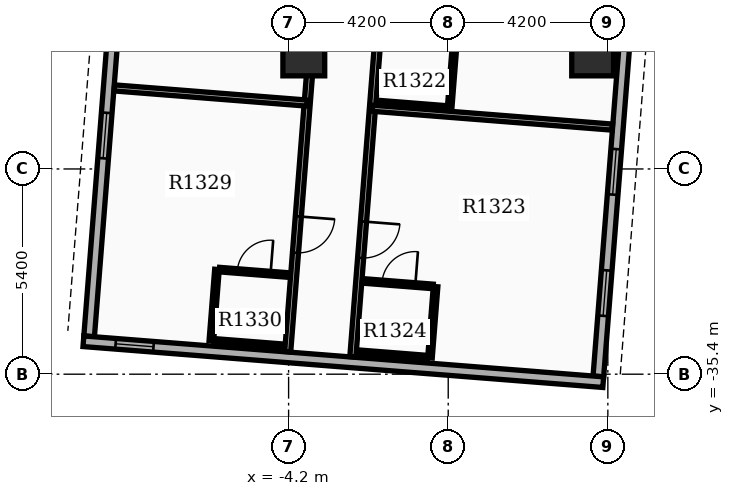
"""IFC4 building model, lengths in metres.
Left out: names, types, materials, properties, quantities, classifications, styles, units other than length and angle.
Written with IfcOpenShell. Run it as: python <this file> out.ifc"""

import sys

from ifc_helpers import new_model, si_unit, direction, frame, frame_2d, origin, origin_2d, place, context, subcontext, project, spatial, rectangle, extrude, element, fill, save


model = new_model("IFC4")
c1 = context("Model", 3, precision=1e-05, world=origin(), true_north=direction((0.0, 1.0)))
c2 = subcontext(c1, "Body", "Model", "MODEL_VIEW")
j1 = project(units=[si_unit("LENGTHUNIT", "METRE"), si_unit("PLANEANGLEUNIT", "RADIAN")], contexts=[c1])
p1 = place(None, origin())
s1 = spatial("IfcSite", under=j1, at=p1, CompositionType="ELEMENT")
p2 = place(p1, origin())
s2 = spatial("IfcBuilding", under=s1, at=p2, CompositionType="ELEMENT")
p3 = place(p2, frame((0.0, 0.0, 83.4)))
s3 = spatial("IfcBuildingStorey", under=s2, at=p3, CompositionType="ELEMENT", Elevation=83.4)
for number, where, z_axis, x_axis in (
    (1, (-3.8, -27.0, 0.0), (0.0, 0.0, 1.0), (1.0, 0.0, 0.0)),
    (2, (3.8, -27.0, 0.0), (0.0, 0.0, 1.0), (1.0, 0.0, 0.0)),
):
    element("IfcColumn", number, at=place(p3, frame(where, z_axis=z_axis, x_axis=x_axis)), inside=s3, PredefinedType="COLUMN", context=c2, shape_type="SweptSolid", body=[
        extrude(rectangle(XDim=1.1, YDim=1.1, at=origin_2d()), origin(), (0.0, 0.0, 1.0), 3.9),
    ])
p4 = place(p3, frame((-7.872, -14.367, 0.0), z_axis=(0.0, 0.0, 1.0), x_axis=(-0.078452802979, -0.996917828963, 0.0)))
e3 = element("IfcWall", 3, at=p4, inside=s3, PredefinedType="STANDARD", context=c2, shape_type="SweptSolid", body=[
    extrude(rectangle(XDim=20.1, YDim=0.28, at=frame_2d((10.05, 0.0))), origin(), (0.0, 0.0, 1.0), 2.91),
])
p5 = place(p4, frame((1.6, 0.0, 0.8)))
e4 = element("IfcOpeningElement", 4, at=p5, cuts=e3, PredefinedType="OPENING", context=c2, shape_type="SweptSolid", body=[
    extrude(rectangle(XDim=1.2, YDim=1.6, at=frame_2d((0.6, 0.8))), frame((0.0, 0.15, 0.0), z_axis=(0.0, -1.0, 0.0), x_axis=(1.0, 0.0, 0.0)), (0.0, 0.0, 1.0), 0.3),
])
p6 = place(p4, frame((7.05, 0.0, 0.8)))
e5 = element("IfcOpeningElement", 5, at=p6, cuts=e3, PredefinedType="OPENING", context=c2, shape_type="SweptSolid", body=[
    extrude(rectangle(XDim=1.2, YDim=1.6, at=frame_2d((0.6, 0.8))), frame((0.0, 0.15, 0.0), z_axis=(0.0, -1.0, 0.0), x_axis=(1.0, 0.0, 0.0)), (0.0, 0.0, 1.0), 0.3),
])
p7 = place(p4, frame((10.25, 0.0, 0.8)))
e6 = element("IfcOpeningElement", 6, at=p7, cuts=e3, PredefinedType="OPENING", context=c2, shape_type="SweptSolid", body=[
    extrude(rectangle(XDim=1.2, YDim=1.6, at=frame_2d((0.6, 0.8))), frame((0.0, 0.15, 0.0), z_axis=(0.0, -1.0, 0.0), x_axis=(1.0, 0.0, 0.0)), (0.0, 0.0, 1.0), 0.3),
])
p8 = place(p4, frame((14.2, 0.0, 0.8)))
e7 = element("IfcOpeningElement", 7, at=p8, cuts=e3, PredefinedType="OPENING", context=c2, shape_type="SweptSolid", body=[
    extrude(rectangle(XDim=1.2, YDim=1.6, at=frame_2d((0.6, 0.8))), frame((0.0, 0.15, 0.0), z_axis=(0.0, -1.0, 0.0), x_axis=(1.0, 0.0, 0.0)), (0.0, 0.0, 1.0), 0.3),
])
p9 = place(p3, frame((3.95, -35.459, 0.0), z_axis=(0.0, 0.0, 1.0), x_axis=(0.078452802979, 0.996917828963, 0.0)))
e8 = element("IfcWall", 8, at=p9, inside=s3, PredefinedType="STANDARD", context=c2, shape_type="SweptSolid", body=[
    extrude(rectangle(XDim=20.1, YDim=0.28, at=frame_2d((10.05, 0.0))), origin(), (0.0, 0.0, 1.0), 2.91),
])
p10 = place(p9, frame((1.6, 0.0, 0.8)))
e9 = element("IfcOpeningElement", 9, at=p10, cuts=e8, PredefinedType="OPENING", context=c2, shape_type="SweptSolid", body=[
    extrude(rectangle(XDim=1.2, YDim=1.6, at=frame_2d((0.6, 0.8))), frame((0.0, 0.15, 0.0), z_axis=(0.0, -1.0, 0.0), x_axis=(1.0, 0.0, 0.0)), (0.0, 0.0, 1.0), 0.3),
])
p11 = place(p9, frame((4.8, 0.0, 0.8)))
e10 = element("IfcOpeningElement", 10, at=p11, cuts=e8, PredefinedType="OPENING", context=c2, shape_type="SweptSolid", body=[
    extrude(rectangle(XDim=1.2, YDim=1.6, at=frame_2d((0.6, 0.8))), frame((0.0, 0.15, 0.0), z_axis=(0.0, -1.0, 0.0), x_axis=(1.0, 0.0, 0.0)), (0.0, 0.0, 1.0), 0.3),
])
p12 = place(p9, frame((9.5, 0.0, 0.8)))
e11 = element("IfcOpeningElement", 11, at=p12, cuts=e8, PredefinedType="OPENING", context=c2, shape_type="SweptSolid", body=[
    extrude(rectangle(XDim=1.2, YDim=1.6, at=frame_2d((0.6, 0.8))), frame((0.0, 0.15, 0.0), z_axis=(0.0, -1.0, 0.0), x_axis=(1.0, 0.0, 0.0)), (0.0, 0.0, 1.0), 0.3),
])
p13 = place(p9, frame((14.2, 0.0, 0.8)))
e12 = element("IfcOpeningElement", 12, at=p13, cuts=e8, PredefinedType="OPENING", context=c2, shape_type="SweptSolid", body=[
    extrude(rectangle(XDim=1.2, YDim=1.6, at=frame_2d((0.6, 0.8))), frame((0.0, 0.15, 0.0), z_axis=(0.0, -1.0, 0.0), x_axis=(1.0, 0.0, 0.0)), (0.0, 0.0, 1.0), 0.3),
])
p14 = place(p3, frame((-9.599, -34.533, 0.0), z_axis=(0.0, 0.0, 1.0), x_axis=(0.996916198482, -0.078473519122, 0.0)))
e13 = element("IfcWall", 13, at=p14, inside=s3, PredefinedType="STANDARD", context=c2, shape_type="SweptSolid", body=[
    extrude(rectangle(XDim=13.72, YDim=0.28, at=frame_2d((6.86, 0.0))), origin(), (0.0, 0.0, 1.0), 2.91),
])
p15 = place(p14, frame((0.85, 0.0, 0.85)))
e14 = element("IfcOpeningElement", 14, at=p15, cuts=e13, PredefinedType="OPENING", context=c2, shape_type="SweptSolid", body=[
    extrude(rectangle(XDim=1.0, YDim=1.5, at=frame_2d((0.5, 0.75))), frame((0.0, 0.15, 0.0), z_axis=(0.0, -1.0, 0.0), x_axis=(1.0, 0.0, 0.0)), (0.0, 0.0, 1.0), 0.3),
])
p16 = place(p3, frame((-0.926, -14.823, 0.0), z_axis=(0.0, 0.0, 1.0), x_axis=(-0.078460461943, -0.996917226209, 0.0)))
e15 = element("IfcWall", 15, at=p16, inside=s3, PredefinedType="PARTITIONING", context=c2, shape_type="SweptSolid", body=[
    extrude(rectangle(XDim=20.182, YDim=0.16, at=frame_2d((10.091, 0.0))), origin(), (0.0, 0.0, 1.0), 2.9),
])
p17 = place(p16, frame((0.731, 0.0, 0.0)))
e16 = element("IfcOpeningElement", 16, at=p17, cuts=e15, PredefinedType="OPENING", context=c2, shape_type="SweptSolid", body=[
    extrude(rectangle(XDim=0.96, YDim=2.15, at=frame_2d((0.48, 1.075))), frame((0.0, 0.09, 0.0), z_axis=(0.0, -1.0, 0.0), x_axis=(1.0, 0.0, 0.0)), (0.0, 0.0, 1.0), 0.18),
])
p18 = place(p16, frame((7.896, 0.0, 0.0)))
e17 = element("IfcOpeningElement", 17, at=p18, cuts=e15, PredefinedType="OPENING", context=c2, shape_type="SweptSolid", body=[
    extrude(rectangle(XDim=0.96, YDim=2.15, at=frame_2d((0.48, 1.075))), frame((0.0, 0.09, 0.0), z_axis=(0.0, -1.0, 0.0), x_axis=(1.0, 0.0, 0.0)), (0.0, 0.0, 1.0), 0.18),
])
p19 = place(p16, frame((16.611, 0.0, 0.0)))
e18 = element("IfcOpeningElement", 18, at=p19, cuts=e15, PredefinedType="OPENING", context=c2, shape_type="SweptSolid", body=[
    extrude(rectangle(XDim=0.96, YDim=2.15, at=frame_2d((0.48, 1.075))), frame((0.0, 0.09, 0.0), z_axis=(0.0, -1.0, 0.0), x_axis=(1.0, 0.0, 0.0)), (0.0, 0.0, 1.0), 0.18),
])
p20 = place(p3, frame((-1.994, -28.402, 0.0), z_axis=(0.0, 0.0, 1.0), x_axis=(0.996916828941, -0.078465509453, 0.0)))
e19 = element("IfcWall", 19, at=p20, inside=s3, PredefinedType="PARTITIONING", context=c2, shape_type="SweptSolid", body=[
    extrude(rectangle(XDim=6.332, YDim=0.16, at=frame_2d((3.166, 0.0))), origin(), (0.0, 0.0, 1.0), 2.9),
])
p21 = place(p3, frame((-1.842, -28.253, 0.0), z_axis=(0.0, 0.0, 1.0), x_axis=(0.996915574626, -0.078481444107, 0.0)))
e20 = element("IfcWall", 20, at=p21, inside=s3, PredefinedType="PARTITIONING", context=c2, shape_type="SweptSolid", body=[
    extrude(rectangle(XDim=1.82, YDim=0.12, at=frame_2d((0.91, 0.0))), origin(), (0.0, 0.0, 1.0), 2.9),
])
p22 = place(p3, frame((0.184, -26.527, 0.0), z_axis=(0.0, 0.0, 1.0), x_axis=(-0.07843418698, -0.996919293781, 0.0)))
e21 = element("IfcWall", 21, at=p22, inside=s3, PredefinedType="PARTITIONING", context=c2, shape_type="SweptSolid", body=[
    extrude(rectangle(XDim=1.88, YDim=0.12, at=frame_2d((0.94, 0.0))), origin(), (0.0, 0.0, 1.0), 2.9),
])
p23 = place(p3, frame((-2.212, -32.948, 0.0), z_axis=(0.0, 0.0, 1.0), x_axis=(0.996916400774, -0.0784709492, 0.0)))
e22 = element("IfcWall", 22, at=p23, inside=s3, PredefinedType="PARTITIONING", context=c2, shape_type="SweptSolid", body=[
    extrude(rectangle(XDim=1.82, YDim=0.12, at=frame_2d((0.91, 0.0))), origin(), (0.0, 0.0, 1.0), 2.9),
])
p24 = place(p23, frame((0.47, 0.0, 0.0)))
e23 = element("IfcOpeningElement", 23, at=p24, cuts=e22, PredefinedType="OPENING", context=c2, shape_type="SweptSolid", body=[
    extrude(rectangle(XDim=0.88, YDim=2.1, at=frame_2d((0.44, 1.05))), frame((0.0, 0.07, 0.0), z_axis=(0.0, -1.0, 0.0), x_axis=(1.0, 0.0, 0.0)), (0.0, 0.0, 1.0), 0.14),
])
p25 = place(p3, frame((-2.359, -34.822, 0.0), z_axis=(0.0, 0.0, 1.0), x_axis=(0.996916400774, -0.0784709492, 0.0)))
e24 = element("IfcWall", 24, at=p25, inside=s3, PredefinedType="PARTITIONING", context=c2, shape_type="SweptSolid", body=[
    extrude(rectangle(XDim=1.82, YDim=0.12, at=frame_2d((0.91, 0.0))), origin(), (0.0, 0.0, 1.0), 2.9),
])
p26 = place(p3, frame((-0.333, -33.096, 0.0), z_axis=(0.0, 0.0, 1.0), x_axis=(-0.07843418698, -0.996919293781, 0.0)))
e25 = element("IfcWall", 25, at=p26, inside=s3, PredefinedType="PARTITIONING", context=c2, shape_type="SweptSolid", body=[
    extrude(rectangle(XDim=1.88, YDim=0.12, at=frame_2d((0.94, 0.0))), origin(), (0.0, 0.0, 1.0), 2.9),
])
p27 = place(p3, frame((-2.641, -14.688, 0.0), z_axis=(0.0, 0.0, 1.0), x_axis=(-0.078460461943, -0.996917226209, 0.0)))
e26 = element("IfcWall", 26, at=p27, inside=s3, PredefinedType="PARTITIONING", context=c2, shape_type="SweptSolid", body=[
    extrude(rectangle(XDim=20.182, YDim=0.16, at=frame_2d((10.091, 0.0))), origin(), (0.0, 0.0, 1.0), 2.9),
])
p28 = place(p27, frame((2.636, 0.0, 0.0)))
e27 = element("IfcOpeningElement", 27, at=p28, cuts=e26, PredefinedType="OPENING", context=c2, shape_type="SweptSolid", body=[
    extrude(rectangle(XDim=0.96, YDim=2.15, at=frame_2d((0.48, 1.075))), frame((0.0, 0.09, 0.0), z_axis=(0.0, -1.0, 0.0), x_axis=(1.0, 0.0, 0.0)), (0.0, 0.0, 1.0), 0.18),
])
p29 = place(p27, frame((9.243, 0.0, 0.0)))
e28 = element("IfcOpeningElement", 28, at=p29, cuts=e26, PredefinedType="OPENING", context=c2, shape_type="SweptSolid", body=[
    extrude(rectangle(XDim=0.96, YDim=2.15, at=frame_2d((0.48, 1.075))), frame((0.0, 0.09, 0.0), z_axis=(0.0, -1.0, 0.0), x_axis=(1.0, 0.0, 0.0)), (0.0, 0.0, 1.0), 0.18),
])
p30 = place(p27, frame((16.611, 0.0, 0.0)))
e29 = element("IfcOpeningElement", 29, at=p30, cuts=e26, PredefinedType="OPENING", context=c2, shape_type="SweptSolid", body=[
    extrude(rectangle(XDim=0.96, YDim=2.15, at=frame_2d((0.48, 1.075))), frame((0.0, 0.09, 0.0), z_axis=(0.0, -1.0, 0.0), x_axis=(1.0, 0.0, 0.0)), (0.0, 0.0, 1.0), 0.18),
])
p31 = place(p3, frame((-3.709, -28.267, 0.0), z_axis=(0.0, 0.0, 1.0), x_axis=(-0.996919000774, 0.078437911089, 0.0)))
e30 = element("IfcWall", 30, at=p31, inside=s3, PredefinedType="PARTITIONING", context=c2, shape_type="SweptSolid", body=[
    extrude(rectangle(XDim=5.092, YDim=0.16, at=frame_2d((2.546, 0.0))), origin(), (0.0, 0.0, 1.0), 2.9),
])
p32 = place(p3, frame((-6.02, -32.648, 0.0), z_axis=(0.0, 0.0, 1.0), x_axis=(0.996915574626, -0.078481444107, 0.0)))
e31 = element("IfcWall", 31, at=p32, inside=s3, PredefinedType="PARTITIONING", context=c2, shape_type="SweptSolid", body=[
    extrude(rectangle(XDim=1.82, YDim=0.12, at=frame_2d((0.91, 0.0))), origin(), (0.0, 0.0, 1.0), 2.9),
])
p33 = place(p32, frame((0.47, 0.0, 0.0)))
e32 = element("IfcOpeningElement", 32, at=p33, cuts=e31, PredefinedType="OPENING", context=c2, shape_type="SweptSolid", body=[
    extrude(rectangle(XDim=0.88, YDim=2.1, at=frame_2d((0.44, 1.05))), frame((0.0, 0.07, 0.0), z_axis=(0.0, -1.0, 0.0), x_axis=(1.0, 0.0, 0.0)), (0.0, 0.0, 1.0), 0.14),
])
p34 = place(p3, frame((-6.167, -34.522, 0.0), z_axis=(0.0, 0.0, 1.0), x_axis=(0.996915574626, -0.078481444107, 0.0)))
e33 = element("IfcWall", 33, at=p34, inside=s3, PredefinedType="PARTITIONING", context=c2, shape_type="SweptSolid", body=[
    extrude(rectangle(XDim=1.82, YDim=0.12, at=frame_2d((0.91, 0.0))), origin(), (0.0, 0.0, 1.0), 2.9),
])
p35 = place(p3, frame((-6.085, -32.643, 0.0), z_axis=(0.0, 0.0, 1.0), x_axis=(-0.078444342213, -0.99691849475, 0.0)))
e34 = element("IfcWall", 34, at=p35, inside=s3, PredefinedType="PARTITIONING", context=c2, shape_type="SweptSolid", body=[
    extrude(rectangle(XDim=1.88, YDim=0.12, at=frame_2d((0.94, 0.0))), origin(), (0.0, 0.0, 1.0), 2.9),
])
p36 = place(p8, origin())
e35 = element("IfcWindow", 35, at=p36, inside=s3, PartitioningType="SINGLE_PANEL", PredefinedType="WINDOW", context=c2, shape_type="SweptSolid", body=[
    extrude(rectangle(XDim=1.2, YDim=1.6, at=frame_2d((0.6, 0.8))), frame((0.0, 0.03, 0.0), z_axis=(0.0, -1.0, 0.0), x_axis=(1.0, 0.0, 0.0)), (0.0, 0.0, 1.0), 0.06),
])
fill(e7, e35)
p37 = place(p10, origin())
e36 = element("IfcWindow", 36, at=p37, inside=s3, PartitioningType="SINGLE_PANEL", PredefinedType="WINDOW", context=c2, shape_type="SweptSolid", body=[
    extrude(rectangle(XDim=1.2, YDim=1.6, at=frame_2d((0.6, 0.8))), frame((0.0, 0.03, 0.0), z_axis=(0.0, -1.0, 0.0), x_axis=(1.0, 0.0, 0.0)), (0.0, 0.0, 1.0), 0.06),
])
fill(e9, e36)
p38 = place(p11, origin())
e37 = element("IfcWindow", 37, at=p38, inside=s3, PartitioningType="SINGLE_PANEL", PredefinedType="WINDOW", context=c2, shape_type="SweptSolid", body=[
    extrude(rectangle(XDim=1.2, YDim=1.6, at=frame_2d((0.6, 0.8))), frame((0.0, 0.03, 0.0), z_axis=(0.0, -1.0, 0.0), x_axis=(1.0, 0.0, 0.0)), (0.0, 0.0, 1.0), 0.06),
])
fill(e10, e37)
p39 = place(p15, origin())
e38 = element("IfcWindow", 38, at=p39, inside=s3, PartitioningType="SINGLE_PANEL", PredefinedType="WINDOW", context=c2, shape_type="SweptSolid", body=[
    extrude(rectangle(XDim=1.0, YDim=1.5, at=frame_2d((0.5, 0.75))), frame((0.0, 0.03, 0.0), z_axis=(0.0, -1.0, 0.0), x_axis=(1.0, 0.0, 0.0)), (0.0, 0.0, 1.0), 0.06),
])
fill(e14, e38)
p40 = place(p19, origin())
e39 = element("IfcDoor", 39, at=p40, inside=s3, OperationType="SINGLE_SWING_LEFT", PredefinedType="DOOR", context=c2, shape_type="SweptSolid", body=[
    extrude(rectangle(XDim=0.96, YDim=2.15, at=frame_2d((0.48, 1.075))), frame((0.0, 0.025, 0.0), z_axis=(0.0, -1.0, 0.0), x_axis=(1.0, 0.0, 0.0)), (0.0, 0.0, 1.0), 0.05),
])
fill(e18, e39)
p41 = place(p24, origin())
e40 = element("IfcDoor", 40, at=p41, inside=s3, OperationType="SINGLE_SWING_RIGHT", PredefinedType="DOOR", context=c2, shape_type="SweptSolid", body=[
    extrude(rectangle(XDim=0.88, YDim=2.1, at=frame_2d((0.44, 1.05))), frame((0.0, 0.025, 0.0), z_axis=(0.0, -1.0, 0.0), x_axis=(1.0, 0.0, 0.0)), (0.0, 0.0, 1.0), 0.05),
])
fill(e23, e40)
p42 = place(p30, origin())
e41 = element("IfcDoor", 41, at=p42, inside=s3, OperationType="SINGLE_SWING_LEFT", PredefinedType="DOOR", context=c2, shape_type="SweptSolid", body=[
    extrude(rectangle(XDim=0.96, YDim=2.15, at=frame_2d((0.48, 1.075))), frame((0.0, 0.025, 0.0), z_axis=(0.0, -1.0, 0.0), x_axis=(1.0, 0.0, 0.0)), (0.0, 0.0, 1.0), 0.05),
])
fill(e29, e41)
p43 = place(p33, origin())
e42 = element("IfcDoor", 42, at=p43, inside=s3, OperationType="SINGLE_SWING_RIGHT", PredefinedType="DOOR", context=c2, shape_type="SweptSolid", body=[
    extrude(rectangle(XDim=0.88, YDim=2.1, at=frame_2d((0.44, 1.05))), frame((0.0, 0.025, 0.0), z_axis=(0.0, -1.0, 0.0), x_axis=(1.0, 0.0, 0.0)), (0.0, 0.0, 1.0), 0.05),
])
fill(e32, e42)
save(model, sys.argv[1])
